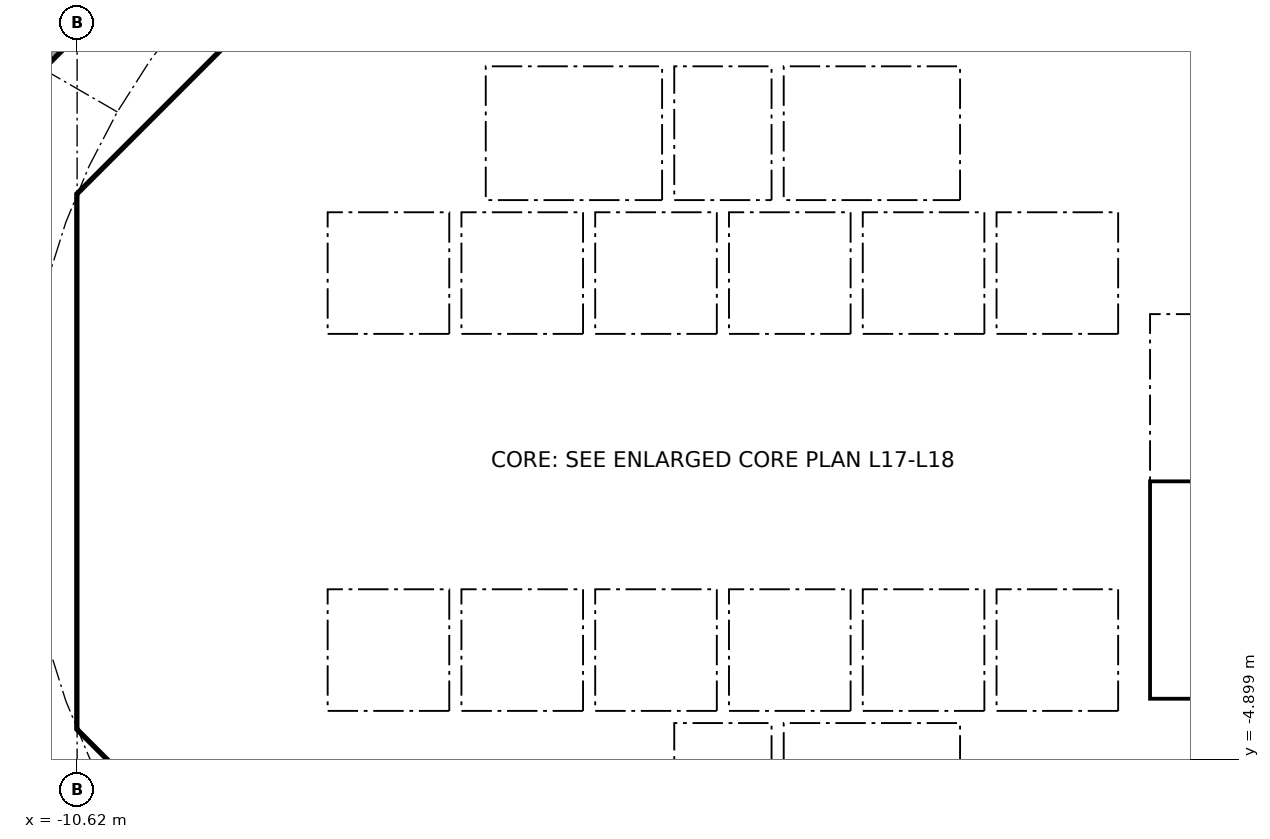
"""IFC4 building model, lengths in metres.
Left out: names, types, materials, properties, quantities, classifications, styles, units other than length and angle.
Written with IfcOpenShell. Run it as: python <this file> out.ifc"""

import sys

from ifc_helpers import new_model, si_unit, direction, frame, frame_2d, origin, place, context, subcontext, project, spatial, polyline, rectangle, outline, extrude, element, fill, save


model = new_model("IFC4")
c1 = context("Model", 3, precision=1e-05, world=origin(), true_north=direction((0.0, 1.0)))
c2 = subcontext(c1, "Body", "Model", "MODEL_VIEW")
j1 = project(units=[si_unit("LENGTHUNIT", "METRE"), si_unit("PLANEANGLEUNIT", "RADIAN")], contexts=[c1])
p1 = place(None, origin())
s1 = spatial("IfcSite", under=j1, at=p1, CompositionType="ELEMENT")
p2 = place(p1, origin())
s2 = spatial("IfcBuilding", under=s1, at=p2, CompositionType="ELEMENT")
p3 = place(p2, frame((0.0, 0.0, 77.0)))
s3 = spatial("IfcBuildingStorey", under=s2, at=p3, CompositionType="ELEMENT", Elevation=77.0)
p4 = place(p3, frame((9.988, 4.613, 0.0), z_axis=(0.0, 0.0, 1.0), x_axis=(-0.707106781187, 0.707106781187, 0.0)))
e1 = element("IfcWall", 1, at=p4, inside=s3, PredefinedType="SHEAR", context=c2, shape_type="SweptSolid", body=[
    extrude(rectangle(XDim=7.602, YDim=0.6, at=frame_2d((3.801, 0.0))), origin(), (0.0, 0.0, 1.0), 3.44),
])
p5 = place(p4, frame((3.201, 0.0, 0.0)))
e2 = element("IfcOpeningElement", 2, at=p5, cuts=e1, PredefinedType="OPENING", context=c2, shape_type="SweptSolid", body=[
    extrude(rectangle(XDim=1.2, YDim=2.1, at=frame_2d((0.6, 1.05))), frame((0.0, 0.31, 0.0), z_axis=(0.0, -1.0, 0.0), x_axis=(1.0, 0.0, 0.0)), (0.0, 0.0, 1.0), 0.62),
])
p6 = place(p3, frame((-4.613, 9.988, 0.0), z_axis=(0.0, 0.0, 1.0), x_axis=(-0.707106781187, -0.707106781187, 0.0)))
e3 = element("IfcWall", 3, at=p6, inside=s3, PredefinedType="SHEAR", context=c2, shape_type="SweptSolid", body=[
    extrude(rectangle(XDim=7.602, YDim=0.6, at=frame_2d((3.801, 0.0))), origin(), (0.0, 0.0, 1.0), 3.44),
])
p7 = place(p6, frame((0.351, 0.0, 0.0)))
e4 = element("IfcOpeningElement", 4, at=p7, cuts=e3, PredefinedType="OPENING", context=c2, shape_type="SweptSolid", body=[
    extrude(rectangle(XDim=1.1, YDim=2.1, at=frame_2d((0.55, 1.05))), frame((0.0, 0.31, 0.0), z_axis=(0.0, -1.0, 0.0), x_axis=(1.0, 0.0, 0.0)), (0.0, 0.0, 1.0), 0.62),
])
p8 = place(p3, frame((-10.325, 3.801, 0.0), z_axis=(0.0, 0.0, 1.0), x_axis=(0.0, -1.0, 0.0)))
e5 = element("IfcWall", 5, at=p8, inside=s3, PredefinedType="SHEAR", context=c2, shape_type="SweptSolid", body=[
    extrude(rectangle(XDim=7.602, YDim=0.6, at=frame_2d((3.801, 0.0))), origin(), (0.0, 0.0, 1.0), 3.44),
])
p9 = place(p8, frame((0.651, 0.0, 0.0)))
e6 = element("IfcOpeningElement", 6, at=p9, cuts=e5, PredefinedType="OPENING", context=c2, shape_type="SweptSolid", body=[
    extrude(rectangle(XDim=1.5, YDim=2.1, at=frame_2d((0.75, 1.05))), frame((0.0, 0.31, 0.0), z_axis=(0.0, -1.0, 0.0), x_axis=(1.0, 0.0, 0.0)), (0.0, 0.0, 1.0), 0.62),
])
p10 = place(p8, frame((5.451, 0.0, 0.0)))
e7 = element("IfcOpeningElement", 7, at=p10, cuts=e5, PredefinedType="OPENING", context=c2, shape_type="SweptSolid", body=[
    extrude(rectangle(XDim=1.5, YDim=2.1, at=frame_2d((0.75, 1.05))), frame((0.0, 0.31, 0.0), z_axis=(0.0, -1.0, 0.0), x_axis=(1.0, 0.0, 0.0)), (0.0, 0.0, 1.0), 0.62),
])
p11 = place(p3, frame((-9.988, -4.613, 0.0), z_axis=(0.0, 0.0, 1.0), x_axis=(0.707106781187, -0.707106781187, 0.0)))
e8 = element("IfcWall", 8, at=p11, inside=s3, PredefinedType="SHEAR", context=c2, shape_type="SweptSolid", body=[
    extrude(rectangle(XDim=7.602, YDim=0.6, at=frame_2d((3.801, 0.0))), origin(), (0.0, 0.0, 1.0), 3.44),
])
p12 = place(p11, frame((6.151, 0.0, 0.0)))
e9 = element("IfcOpeningElement", 9, at=p12, cuts=e8, PredefinedType="OPENING", context=c2, shape_type="SweptSolid", body=[
    extrude(rectangle(XDim=1.1, YDim=2.1, at=frame_2d((0.55, 1.05))), frame((0.0, 0.31, 0.0), z_axis=(0.0, -1.0, 0.0), x_axis=(1.0, 0.0, 0.0)), (0.0, 0.0, 1.0), 0.62),
])
p13 = place(p3, frame((4.613, -9.988, 0.0), z_axis=(0.0, 0.0, 1.0), x_axis=(0.707106781187, 0.707106781187, 0.0)))
e10 = element("IfcWall", 10, at=p13, inside=s3, PredefinedType="SHEAR", context=c2, shape_type="SweptSolid", body=[
    extrude(rectangle(XDim=7.602, YDim=0.6, at=frame_2d((3.801, 0.0))), origin(), (0.0, 0.0, 1.0), 3.44),
])
p14 = place(p13, frame((3.201, 0.0, 0.0)))
e11 = element("IfcOpeningElement", 11, at=p14, cuts=e10, PredefinedType="OPENING", context=c2, shape_type="SweptSolid", body=[
    extrude(rectangle(XDim=1.2, YDim=2.1, at=frame_2d((0.6, 1.05))), frame((0.0, 0.31, 0.0), z_axis=(0.0, -1.0, 0.0), x_axis=(1.0, 0.0, 0.0)), (0.0, 0.0, 1.0), 0.62),
])
p15 = place(p3, frame((-6.2, 4.3, 0.0), z_axis=(0.0, 0.0, 1.0), x_axis=(0.0, 1.0, 0.0)))
e12 = element("IfcWall", 12, at=p15, inside=s3, PredefinedType="PARTITIONING", context=c2, shape_type="SweptSolid", body=[
    extrude(rectangle(XDim=3.527, YDim=0.15, at=frame_2d((1.763, 0.0))), origin(), (0.0, 0.0, 1.0), 3.44),
])
p16 = place(p15, frame((0.262, 0.0, 0.0)))
e13 = element("IfcOpeningElement", 13, at=p16, cuts=e12, PredefinedType="OPENING", context=c2, shape_type="SweptSolid", body=[
    extrude(rectangle(XDim=0.9, YDim=2.1, at=frame_2d((0.45, 1.05))), frame((0.0, 0.085, 0.0), z_axis=(0.0, -1.0, 0.0), x_axis=(1.0, 0.0, 0.0)), (0.0, 0.0, 1.0), 0.17),
])
p17 = place(p15, frame((2.138, 0.0, 0.0)))
e14 = element("IfcOpeningElement", 14, at=p17, cuts=e12, PredefinedType="OPENING", context=c2, shape_type="SweptSolid", body=[
    extrude(rectangle(XDim=0.9, YDim=2.1, at=frame_2d((0.45, 1.05))), frame((0.0, 0.085, 0.0), z_axis=(0.0, -1.0, 0.0), x_axis=(1.0, 0.0, 0.0)), (0.0, 0.0, 1.0), 0.17),
])
p18 = place(p3, frame((4.0, 4.3, 0.0), z_axis=(0.0, 0.0, 1.0), x_axis=(0.0, 1.0, 0.0)))
e15 = element("IfcWall", 15, at=p18, inside=s3, PredefinedType="SOLIDWALL", context=c2, shape_type="SweptSolid", body=[
    extrude(rectangle(XDim=2.2, YDim=0.2, at=frame_2d((1.1, 0.0))), origin(), (0.0, 0.0, 1.0), 3.44),
])
p19 = place(p18, frame((0.55, 0.0, 0.0)))
e16 = element("IfcOpeningElement", 16, at=p19, cuts=e15, PredefinedType="OPENING", context=c2, shape_type="SweptSolid", body=[
    extrude(rectangle(XDim=1.1, YDim=2.1, at=frame_2d((0.55, 1.05))), frame((0.0, 0.11, 0.0), z_axis=(0.0, -1.0, 0.0), x_axis=(1.0, 0.0, 0.0)), (0.0, 0.0, 1.0), 0.22),
])
p20 = place(p3, frame((-4.0, 4.3, 0.0), z_axis=(0.0, 0.0, 1.0), x_axis=(0.0, 1.0, 0.0)))
e17 = element("IfcWall", 17, at=p20, inside=s3, PredefinedType="SOLIDWALL", context=c2, shape_type="SweptSolid", body=[
    extrude(rectangle(XDim=2.2, YDim=0.2, at=frame_2d((1.1, 0.0))), origin(), (0.0, 0.0, 1.0), 3.44),
])
p21 = place(p20, frame((0.55, 0.0, 0.0)))
e18 = element("IfcOpeningElement", 18, at=p21, cuts=e17, PredefinedType="OPENING", context=c2, shape_type="SweptSolid", body=[
    extrude(rectangle(XDim=1.1, YDim=2.1, at=frame_2d((0.55, 1.05))), frame((0.0, 0.11, 0.0), z_axis=(0.0, -1.0, 0.0), x_axis=(1.0, 0.0, 0.0)), (0.0, 0.0, 1.0), 0.22),
])
p22 = place(p3, frame((-6.7, 2.0, 0.0), z_axis=(0.0, 0.0, 1.0), x_axis=(1.0, 0.0, 0.0)))
e19 = element("IfcWall", 19, at=p22, inside=s3, PredefinedType="SOLIDWALL", context=c2, shape_type="SweptSolid", body=[
    extrude(rectangle(XDim=13.4, YDim=0.2, at=frame_2d((6.7, 0.0))), origin(), (0.0, 0.0, 1.0), 3.44),
])
p23 = place(p22, frame((0.65, 0.0, 0.0)))
e20 = element("IfcOpeningElement", 20, at=p23, cuts=e19, PredefinedType="OPENING", context=c2, shape_type="SweptSolid", body=[
    extrude(rectangle(XDim=1.1, YDim=2.1, at=frame_2d((0.55, 1.05))), frame((0.0, 0.11, 0.0), z_axis=(0.0, -1.0, 0.0), x_axis=(1.0, 0.0, 0.0)), (0.0, 0.0, 1.0), 0.22),
])
p24 = place(p22, frame((2.85, 0.0, 0.0)))
e21 = element("IfcOpeningElement", 21, at=p24, cuts=e19, PredefinedType="OPENING", context=c2, shape_type="SweptSolid", body=[
    extrude(rectangle(XDim=1.1, YDim=2.1, at=frame_2d((0.55, 1.05))), frame((0.0, 0.11, 0.0), z_axis=(0.0, -1.0, 0.0), x_axis=(1.0, 0.0, 0.0)), (0.0, 0.0, 1.0), 0.22),
])
p25 = place(p22, frame((5.05, 0.0, 0.0)))
e22 = element("IfcOpeningElement", 22, at=p25, cuts=e19, PredefinedType="OPENING", context=c2, shape_type="SweptSolid", body=[
    extrude(rectangle(XDim=1.1, YDim=2.1, at=frame_2d((0.55, 1.05))), frame((0.0, 0.11, 0.0), z_axis=(0.0, -1.0, 0.0), x_axis=(1.0, 0.0, 0.0)), (0.0, 0.0, 1.0), 0.22),
])
p26 = place(p3, frame((6.7, 4.0, 0.0), z_axis=(0.0, 0.0, 1.0), x_axis=(1.0, 0.0, 0.0)))
e23 = element("IfcWall", 23, at=p26, inside=s3, PredefinedType="SOLIDWALL", context=c2, shape_type="SweptSolid", body=[
    extrude(rectangle(XDim=3.325, YDim=0.2, at=frame_2d((1.662, 0.0))), origin(), (0.0, 0.0, 1.0), 3.44),
])
p27 = place(p26, frame((1.25, 0.0, 0.0)))
e24 = element("IfcOpeningElement", 24, at=p27, cuts=e23, PredefinedType="OPENING", context=c2, shape_type="SweptSolid", body=[
    extrude(rectangle(XDim=1.1, YDim=2.1, at=frame_2d((0.55, 1.05))), frame((0.0, 0.11, 0.0), z_axis=(0.0, -1.0, 0.0), x_axis=(1.0, 0.0, 0.0)), (0.0, 0.0, 1.0), 0.22),
])
p28 = place(p3, frame((-7.0, -7.027, 0.0), z_axis=(0.0, 0.0, 1.0), x_axis=(0.0, 1.0, 0.0)))
e25 = element("IfcWall", 25, at=p28, inside=s3, PredefinedType="PARTITIONING", context=c2, shape_type="SweptSolid", body=[
    extrude(rectangle(XDim=2.927, YDim=0.15, at=frame_2d((1.463, 0.0))), origin(), (0.0, 0.0, 1.0), 3.44),
])
p29 = place(p28, frame((0.976, 0.0, 0.0)))
e26 = element("IfcOpeningElement", 26, at=p29, cuts=e25, PredefinedType="OPENING", context=c2, shape_type="SweptSolid", body=[
    extrude(rectangle(XDim=0.9, YDim=2.1, at=frame_2d((0.45, 1.05))), frame((0.0, 0.085, 0.0), z_axis=(0.0, -1.0, 0.0), x_axis=(1.0, 0.0, 0.0)), (0.0, 0.0, 1.0), 0.17),
])
p30 = place(p3, frame((4.0, -6.5, 0.0), z_axis=(0.0, 0.0, 1.0), x_axis=(0.0, 1.0, 0.0)))
e27 = element("IfcWall", 27, at=p30, inside=s3, PredefinedType="SOLIDWALL", context=c2, shape_type="SweptSolid", body=[
    extrude(rectangle(XDim=2.2, YDim=0.2, at=frame_2d((1.1, 0.0))), origin(), (0.0, 0.0, 1.0), 3.44),
])
p31 = place(p30, frame((0.55, 0.0, 0.0)))
e28 = element("IfcOpeningElement", 28, at=p31, cuts=e27, PredefinedType="OPENING", context=c2, shape_type="SweptSolid", body=[
    extrude(rectangle(XDim=1.1, YDim=2.1, at=frame_2d((0.55, 1.05))), frame((0.0, 0.11, 0.0), z_axis=(0.0, -1.0, 0.0), x_axis=(1.0, 0.0, 0.0)), (0.0, 0.0, 1.0), 0.22),
])
p32 = place(p3, frame((-4.0, -6.5, 0.0), z_axis=(0.0, 0.0, 1.0), x_axis=(0.0, 1.0, 0.0)))
e29 = element("IfcWall", 29, at=p32, inside=s3, PredefinedType="SOLIDWALL", context=c2, shape_type="SweptSolid", body=[
    extrude(rectangle(XDim=2.2, YDim=0.2, at=frame_2d((1.1, 0.0))), origin(), (0.0, 0.0, 1.0), 3.44),
])
p33 = place(p32, frame((0.65, 0.0, 0.0)))
e30 = element("IfcOpeningElement", 30, at=p33, cuts=e29, PredefinedType="OPENING", context=c2, shape_type="SweptSolid", body=[
    extrude(rectangle(XDim=0.9, YDim=2.1, at=frame_2d((0.45, 1.05))), frame((0.0, 0.11, 0.0), z_axis=(0.0, -1.0, 0.0), x_axis=(1.0, 0.0, 0.0)), (0.0, 0.0, 1.0), 0.22),
])
p34 = place(p3, frame((-6.7, -2.0, 0.0), z_axis=(0.0, 0.0, 1.0), x_axis=(1.0, 0.0, 0.0)))
e31 = element("IfcWall", 31, at=p34, inside=s3, PredefinedType="SOLIDWALL", context=c2, shape_type="SweptSolid", body=[
    extrude(rectangle(XDim=13.4, YDim=0.2, at=frame_2d((6.7, 0.0))), origin(), (0.0, 0.0, 1.0), 3.44),
])
p35 = place(p34, frame((0.65, 0.0, 0.0)))
e32 = element("IfcOpeningElement", 32, at=p35, cuts=e31, PredefinedType="OPENING", context=c2, shape_type="SweptSolid", body=[
    extrude(rectangle(XDim=1.1, YDim=2.1, at=frame_2d((0.55, 1.05))), frame((0.0, 0.11, 0.0), z_axis=(0.0, -1.0, 0.0), x_axis=(1.0, 0.0, 0.0)), (0.0, 0.0, 1.0), 0.22),
])
p36 = place(p34, frame((2.85, 0.0, 0.0)))
e33 = element("IfcOpeningElement", 33, at=p36, cuts=e31, PredefinedType="OPENING", context=c2, shape_type="SweptSolid", body=[
    extrude(rectangle(XDim=1.1, YDim=2.1, at=frame_2d((0.55, 1.05))), frame((0.0, 0.11, 0.0), z_axis=(0.0, -1.0, 0.0), x_axis=(1.0, 0.0, 0.0)), (0.0, 0.0, 1.0), 0.22),
])
p37 = place(p3, origin())
e34 = element("IfcWall", 34, at=p37, inside=s3, PredefinedType="SHEAR", context=c2, shape_type="SweptSolid", body=[
    extrude(outline(polyline([(-10.625, -3.801), (-10.025, -3.801), (-10.025, -4.152), (-9.776, -4.401), (-10.2, -4.825), (-10.625, -4.401), (-10.625, -3.801)])), origin(), (0.0, 0.0, 1.0), 3.44),
])
p38 = place(p3, origin())
e35 = element("IfcWall", 35, at=p38, inside=s3, PredefinedType="SHEAR", context=c2, shape_type="SweptSolid", body=[
    extrude(outline(polyline([(-10.2, 4.825), (-9.776, 4.401), (-10.025, 4.152), (-10.025, 3.801), (-10.625, 3.801), (-10.625, 4.401), (-10.2, 4.825)])), origin(), (0.0, 0.0, 1.0), 3.44),
])
for number, where, z_axis, x_axis in (
    (36, (-10.025, -4.0, 0.0), (0.0, 0.0, 1.0), (1.0, 0.0, 0.0)),
    (37, (-10.025, 4.0, 0.0), (0.0, 0.0, 1.0), (1.0, 0.0, 0.0)),
):
    element("IfcWall", number, at=place(p3, frame(where, z_axis=z_axis, x_axis=x_axis)), inside=s3, PredefinedType="PARTITIONING", context=c2, shape_type="SweptSolid", body=[
        extrude(rectangle(XDim=3.325, YDim=0.2, at=frame_2d((1.662, 0.0))), origin(), (0.0, 0.0, 1.0), 3.44),
    ])
p39 = place(p3, frame((-8.301, 5.8, 0.0), z_axis=(0.0, 0.0, 1.0), x_axis=(1.0, 0.0, 0.0)))
e38 = element("IfcWall", 38, at=p39, inside=s3, PredefinedType="PARTITIONING", context=c2, shape_type="SweptSolid", body=[
    extrude(rectangle(XDim=2.026, YDim=0.15, at=frame_2d((1.013, 0.0))), origin(), (0.0, 0.0, 1.0), 3.44),
])
for number, where, z_axis, x_axis in (
    (39, (-0.9, -6.5, 0.0), (0.0, 0.0, 1.0), (0.0, 1.0, 0.0)),
    (40, (0.9, -6.5, 0.0), (0.0, 0.0, 1.0), (0.0, 1.0, 0.0)),
):
    element("IfcWall", number, at=place(p3, frame(where, z_axis=z_axis, x_axis=x_axis)), inside=s3, PredefinedType="SOLIDWALL", context=c2, shape_type="SweptSolid", body=[
        extrude(rectangle(XDim=2.2, YDim=0.2, at=frame_2d((1.1, 0.0))), origin(), (0.0, 0.0, 1.0), 3.44),
    ])
p40 = place(p3, origin())
e41 = element("IfcWall", 41, at=p40, inside=s3, PredefinedType="SOLIDWALL", context=c2, shape_type="SweptSolid", body=[
    extrude(outline(polyline([(-6.7, -2.1), (-6.5, -2.1), (-6.5, -4.1), (-4.5, -4.1), (-4.5, -2.1), (-4.3, -2.1), (-4.3, -4.1), (-2.3, -4.1), (-2.3, -2.1), (-2.1, -2.1), (-2.1, -4.1), (-0.1, -4.1), (-0.1, -2.1), (0.1, -2.1), (0.1, -4.1), (2.1, -4.1), (2.1, -2.1), (2.3, -2.1), (2.3, -4.1), (4.3, -4.1), (4.3, -2.1), (4.5, -2.1), (4.5, -4.1), (6.5, -4.1), (6.5, -2.1), (6.7, -2.1), (6.7, -4.3), (-6.7, -4.3), (-6.7, -2.1)])), origin(), (0.0, 0.0, 1.0), 3.44),
])
for number, where, z_axis, x_axis in (
    (42, (-0.9, 4.3, 0.0), (0.0, 0.0, 1.0), (0.0, 1.0, 0.0)),
    (43, (0.9, 4.3, 0.0), (0.0, 0.0, 1.0), (0.0, 1.0, 0.0)),
):
    element("IfcWall", number, at=place(p3, frame(where, z_axis=z_axis, x_axis=x_axis)), inside=s3, PredefinedType="SOLIDWALL", context=c2, shape_type="SweptSolid", body=[
        extrude(rectangle(XDim=2.2, YDim=0.2, at=frame_2d((1.1, 0.0))), origin(), (0.0, 0.0, 1.0), 3.44),
    ])
p41 = place(p3, origin())
e44 = element("IfcWall", 44, at=p41, inside=s3, PredefinedType="SOLIDWALL", context=c2, shape_type="SweptSolid", body=[
    extrude(outline(polyline([(-6.5, 2.1), (-6.7, 2.1), (-6.7, 4.3), (6.7, 4.3), (6.7, 2.1), (6.5, 2.1), (6.5, 4.1), (4.5, 4.1), (4.5, 2.1), (4.3, 2.1), (4.3, 4.1), (2.3, 4.1), (2.3, 2.1), (2.1, 2.1), (2.1, 4.1), (0.1, 4.1), (0.1, 2.1), (-0.1, 2.1), (-0.1, 4.1), (-2.1, 4.1), (-2.1, 2.1), (-2.3, 2.1), (-2.3, 4.1), (-4.3, 4.1), (-4.3, 2.1), (-4.5, 2.1), (-4.5, 4.1), (-6.5, 4.1), (-6.5, 2.1)])), origin(), (0.0, 0.0, 1.0), 3.44),
])
p42 = place(p3, origin())
e45 = element("IfcWall", 45, at=p42, inside=s3, PredefinedType="SOLIDWALL", context=c2, shape_type="SweptSolid", body=[
    extrude(outline(polyline([(4.1, 6.5), (-4.1, 6.5), (-4.1, 7.025), (4.1, 7.025), (4.1, 6.5)])), origin(), (0.0, 0.0, 1.0), 3.44),
])
p43 = place(p3, origin())
e46 = element("IfcWall", 46, at=p43, inside=s3, PredefinedType="SOLIDWALL", context=c2, shape_type="SweptSolid", body=[
    extrude(outline(polyline([(7.025, -3.9), (6.7, -3.9), (6.7, 3.9), (7.025, 3.9), (7.025, -3.9)])), origin(), (0.0, 0.0, 1.0), 3.44),
])
p44 = place(p3, origin())
e47 = element("IfcWall", 47, at=p44, inside=s3, PredefinedType="SOLIDWALL", context=c2, shape_type="SweptSolid", body=[
    extrude(outline(polyline([(10.025, -4.1), (6.7, -4.1), (6.7, -3.9), (10.025, -3.9), (10.025, -4.1)])), origin(), (0.0, 0.0, 1.0), 3.44),
])
p45 = place(p3, frame((12.635, 5.134, 0.0), z_axis=(0.0, 0.0, 1.0), x_axis=(-0.707106781187, 0.707106781187, 0.0)))
e48 = element("IfcWall", 48, at=p45, inside=s3, PredefinedType="PARTITIONING", context=c2, shape_type="SweptSolid", body=[
    extrude(rectangle(XDim=10.609, YDim=0.2, at=frame_2d((5.305, 0.0))), origin(), (0.0, 0.0, 1.0), 3.44),
])
p46 = place(p3, frame((-5.275, 12.494, 0.0), z_axis=(0.0, 0.0, 1.0), x_axis=(-0.707106781187, -0.707106781187, 0.0)))
e49 = element("IfcWall", 49, at=p46, inside=s3, PredefinedType="PARTITIONING", context=c2, shape_type="SweptSolid", body=[
    extrude(rectangle(XDim=10.209, YDim=0.2, at=frame_2d((5.104, 0.0))), origin(), (0.0, 0.0, 1.0), 3.44),
])
p47 = place(p23, origin())
e50 = element("IfcDoor", 50, at=p47, inside=s3, OperationType="DOUBLE_DOOR_SLIDING", PredefinedType="DOOR", context=c2, shape_type="SweptSolid", body=[
    extrude(rectangle(XDim=1.1, YDim=2.1, at=frame_2d((0.55, 1.05))), frame((0.0, 0.025, 0.0), z_axis=(0.0, -1.0, 0.0), x_axis=(1.0, 0.0, 0.0)), (0.0, 0.0, 1.0), 0.05),
])
fill(e20, e50)
p48 = place(p24, origin())
e51 = element("IfcDoor", 51, at=p48, inside=s3, OperationType="DOUBLE_DOOR_SLIDING", PredefinedType="DOOR", context=c2, shape_type="SweptSolid", body=[
    extrude(rectangle(XDim=1.1, YDim=2.1, at=frame_2d((0.55, 1.05))), frame((0.0, 0.025, 0.0), z_axis=(0.0, -1.0, 0.0), x_axis=(1.0, 0.0, 0.0)), (0.0, 0.0, 1.0), 0.05),
])
fill(e21, e51)
p49 = place(p25, origin())
e52 = element("IfcDoor", 52, at=p49, inside=s3, OperationType="DOUBLE_DOOR_SLIDING", PredefinedType="DOOR", context=c2, shape_type="SweptSolid", body=[
    extrude(rectangle(XDim=1.1, YDim=2.1, at=frame_2d((0.55, 1.05))), frame((0.0, 0.025, 0.0), z_axis=(0.0, -1.0, 0.0), x_axis=(1.0, 0.0, 0.0)), (0.0, 0.0, 1.0), 0.05),
])
fill(e22, e52)
p50 = place(p35, origin())
e53 = element("IfcDoor", 53, at=p50, inside=s3, OperationType="DOUBLE_DOOR_SLIDING", PredefinedType="DOOR", context=c2, shape_type="SweptSolid", body=[
    extrude(rectangle(XDim=1.1, YDim=2.1, at=frame_2d((0.55, 1.05))), frame((0.0, 0.025, 0.0), z_axis=(0.0, -1.0, 0.0), x_axis=(1.0, 0.0, 0.0)), (0.0, 0.0, 1.0), 0.05),
])
fill(e32, e53)
p51 = place(p36, origin())
e54 = element("IfcDoor", 54, at=p51, inside=s3, OperationType="DOUBLE_DOOR_SLIDING", PredefinedType="DOOR", context=c2, shape_type="SweptSolid", body=[
    extrude(rectangle(XDim=1.1, YDim=2.1, at=frame_2d((0.55, 1.05))), frame((0.0, 0.025, 0.0), z_axis=(0.0, -1.0, 0.0), x_axis=(1.0, 0.0, 0.0)), (0.0, 0.0, 1.0), 0.05),
])
fill(e33, e54)
p52 = place(p19, origin())
e55 = element("IfcDoor", 55, at=p52, inside=s3, OperationType="DOUBLE_DOOR_SLIDING", PredefinedType="DOOR", context=c2, shape_type="SweptSolid", body=[
    extrude(rectangle(XDim=1.1, YDim=2.1, at=frame_2d((0.55, 1.05))), frame((0.0, 0.025, 0.0), z_axis=(0.0, -1.0, 0.0), x_axis=(1.0, 0.0, 0.0)), (0.0, 0.0, 1.0), 0.05),
])
fill(e16, e55)
p53 = place(p31, origin())
e56 = element("IfcDoor", 56, at=p53, inside=s3, OperationType="DOUBLE_DOOR_SLIDING", PredefinedType="DOOR", context=c2, shape_type="SweptSolid", body=[
    extrude(rectangle(XDim=1.1, YDim=2.1, at=frame_2d((0.55, 1.05))), frame((0.0, 0.025, 0.0), z_axis=(0.0, -1.0, 0.0), x_axis=(1.0, 0.0, 0.0)), (0.0, 0.0, 1.0), 0.05),
])
fill(e28, e56)
p54 = place(p21, origin())
e57 = element("IfcDoor", 57, at=p54, inside=s3, OperationType="DOUBLE_DOOR_SLIDING", PredefinedType="DOOR", context=c2, shape_type="SweptSolid", body=[
    extrude(rectangle(XDim=1.1, YDim=2.1, at=frame_2d((0.55, 1.05))), frame((0.0, 0.025, 0.0), z_axis=(0.0, -1.0, 0.0), x_axis=(1.0, 0.0, 0.0)), (0.0, 0.0, 1.0), 0.05),
])
fill(e18, e57)
p55 = place(p16, origin())
e58 = element("IfcDoor", 58, at=p55, inside=s3, OperationType="SINGLE_SWING_LEFT", PredefinedType="DOOR", context=c2, shape_type="SweptSolid", body=[
    extrude(rectangle(XDim=0.9, YDim=2.1, at=frame_2d((0.45, 1.05))), frame((0.0, 0.025, 0.0), z_axis=(0.0, -1.0, 0.0), x_axis=(1.0, 0.0, 0.0)), (0.0, 0.0, 1.0), 0.05),
])
fill(e13, e58)
p56 = place(p17, origin())
e59 = element("IfcDoor", 59, at=p56, inside=s3, OperationType="SINGLE_SWING_LEFT", PredefinedType="DOOR", context=c2, shape_type="SweptSolid", body=[
    extrude(rectangle(XDim=0.9, YDim=2.1, at=frame_2d((0.45, 1.05))), frame((0.0, 0.025, 0.0), z_axis=(0.0, -1.0, 0.0), x_axis=(1.0, 0.0, 0.0)), (0.0, 0.0, 1.0), 0.05),
])
fill(e14, e59)
p57 = place(p9, origin())
e60 = element("IfcDoor", 60, at=p57, inside=s3, OperationType="DOUBLE_DOOR_SINGLE_SWING", PredefinedType="DOOR", context=c2, shape_type="SweptSolid", body=[
    extrude(rectangle(XDim=1.5, YDim=2.1, at=frame_2d((0.75, 1.05))), frame((0.0, 0.025, 0.0), z_axis=(0.0, -1.0, 0.0), x_axis=(1.0, 0.0, 0.0)), (0.0, 0.0, 1.0), 0.05),
])
fill(e6, e60)
p58 = place(p10, origin())
e61 = element("IfcDoor", 61, at=p58, inside=s3, OperationType="DOUBLE_DOOR_SINGLE_SWING", PredefinedType="DOOR", context=c2, shape_type="SweptSolid", body=[
    extrude(rectangle(XDim=1.5, YDim=2.1, at=frame_2d((0.75, 1.05))), frame((0.0, 0.025, 0.0), z_axis=(0.0, -1.0, 0.0), x_axis=(1.0, 0.0, 0.0)), (0.0, 0.0, 1.0), 0.05),
])
fill(e7, e61)
save(model, sys.argv[1])
